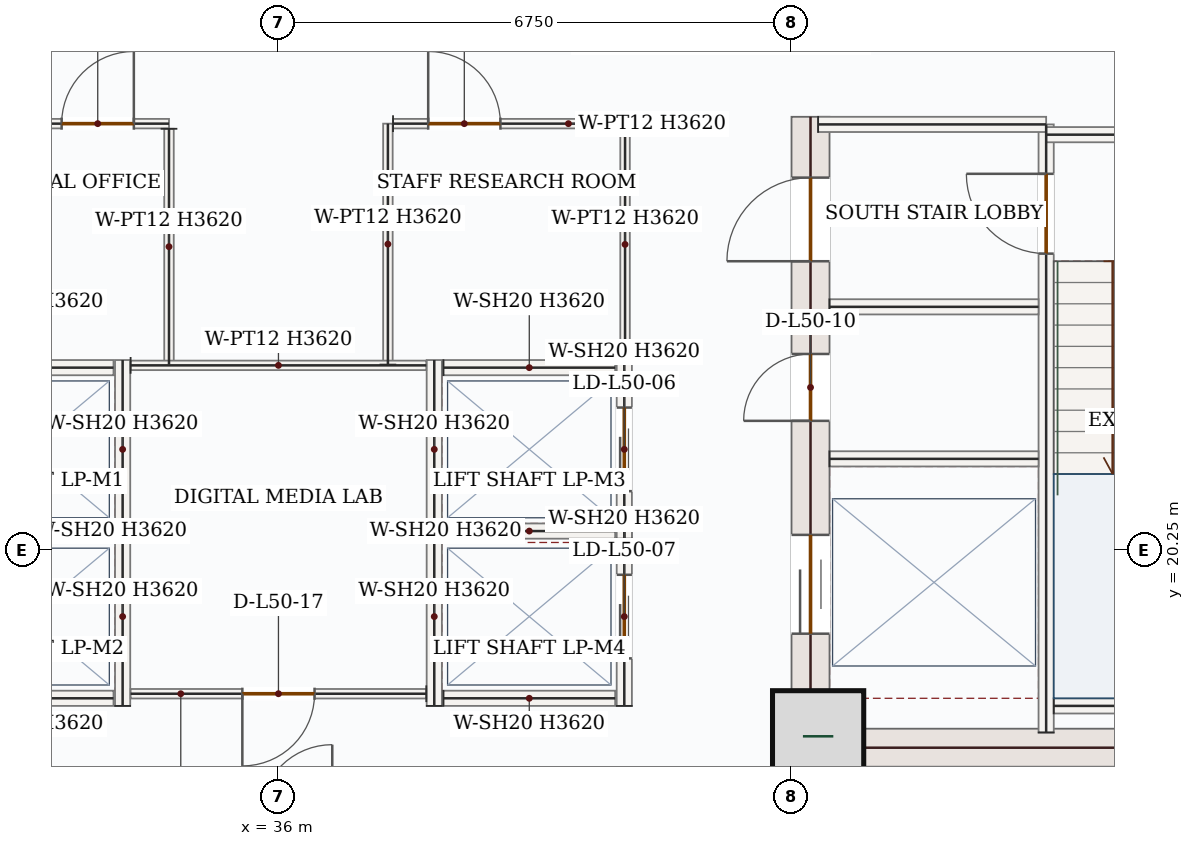
"""IFC4 building model, lengths in metres.
Left out: names, types, materials, properties, quantities, classifications, styles, units other than length and angle.
Written with IfcOpenShell. Run it as: python <this file> out.ifc"""

import sys

from ifc_helpers import new_model, si_unit, direction, frame, frame_2d, origin, origin_2d, place, context, subcontext, project, spatial, rectangle, extrude, source, transform, mapped, element, fill, save


model = new_model("IFC4")
c1 = context("Model", 3, precision=1e-05, world=origin(), true_north=direction((0.0, 1.0)))
c2 = subcontext(c1, "Body", "Model", "MODEL_VIEW")
j1 = project(units=[si_unit("LENGTHUNIT", "METRE"), si_unit("PLANEANGLEUNIT", "RADIAN")], contexts=[c1])
p1 = place(None, origin())
s1 = spatial("IfcSite", under=j1, at=p1, CompositionType="ELEMENT")
p2 = place(p1, origin())
s2 = spatial("IfcBuilding", under=s1, at=p2, CompositionType="ELEMENT")
p3 = place(p2, frame((0.0, 0.0, 213.6)))
s3 = spatial("IfcBuildingStorey", under=s2, at=p3, CompositionType="ELEMENT", Elevation=213.6)
p4 = place(p3, frame((43.0, 17.4, 0.0), z_axis=(0.0, 0.0, 1.0), x_axis=(0.0, 1.0, 0.0)))
e1 = element("IfcWall", 1, at=p4, inside=s3, PredefinedType="SHEAR", context=c2, shape_type="SweptSolid", body=[
    extrude(rectangle(XDim=8.55, YDim=0.5, at=frame_2d((4.275, 0.0))), origin(), (0.0, 0.0, 1.0), 3.62),
])
p5 = place(p4, frame((6.65, 0.0, 0.0)))
e2 = element("IfcOpeningElement", 2, at=p5, cuts=e1, PredefinedType="OPENING", context=c2, shape_type="SweptSolid", body=[
    extrude(rectangle(XDim=1.1, YDim=2.2, at=frame_2d((0.55, 1.1))), frame((0.0, 0.26, 0.0), z_axis=(0.0, -1.0, 0.0), x_axis=(1.0, 0.0, 0.0)), (0.0, 0.0, 1.0), 0.52),
])
p6 = place(p4, frame((1.75, 0.0, 0.0)))
e3 = element("IfcOpeningElement", 3, at=p6, cuts=e1, PredefinedType="OPENING", context=c2, shape_type="SweptSolid", body=[
    extrude(rectangle(XDim=1.3, YDim=2.2, at=frame_2d((0.65, 1.1))), frame((0.0, 0.26, 0.0), z_axis=(0.0, -1.0, 0.0), x_axis=(1.0, 0.0, 0.0)), (0.0, 0.0, 1.0), 0.52),
])
p7 = place(p4, frame((4.55, 0.0, 0.0)))
e4 = element("IfcOpeningElement", 4, at=p7, cuts=e1, PredefinedType="OPENING", context=c2, shape_type="SweptSolid", body=[
    extrude(rectangle(XDim=0.88, YDim=2.1, at=frame_2d((0.44, 1.05))), frame((0.0, 0.26, 0.0), z_axis=(0.0, -1.0, 0.0), x_axis=(1.0, 0.0, 0.0)), (0.0, 0.0, 1.0), 0.52),
])
m1 = source(origin(), c2, "Body", "SweptSolid", [
    extrude(rectangle(XDim=7.0, YDim=0.5, at=frame_2d((3.5, 0.0))), origin(), (0.0, 0.0, 1.0), 3.62),
])
p8 = place(p3, frame((43.25, 17.65, 0.0), z_axis=(0.0, 0.0, 1.0), x_axis=(1.0, 0.0, 0.0)))
e5 = element("IfcWall", 5, at=p8, inside=s3, PredefinedType="SHEAR", context=c2, shape_type="MappedRepresentation", body=[
    mapped(m1, transform((0.0, 0.0, 0.0), x_axis=(1.0, 0.0, 0.0), y_axis=(0.0, 1.0, 0.0), z_axis=(0.0, 0.0, 1.0), scale=1.0)),
])
m2 = source(origin(), c2, "Body", "SweptSolid", [
    extrude(rectangle(XDim=1.2, YDim=1.2, at=origin_2d()), origin(), (0.0, 0.0, 1.0), 3.9),
])
p9 = place(p3, frame((43.1, 17.8, 0.0), z_axis=(0.0, 0.0, 1.0), x_axis=(1.0, 0.0, 0.0)))
e6 = element("IfcColumn", 6, at=p9, inside=s3, PredefinedType="COLUMN", context=c2, shape_type="MappedRepresentation", body=[
    mapped(m2, transform((0.0, 0.0, 0.0), x_axis=(1.0, 0.0, 0.0), y_axis=(0.0, 1.0, 0.0), z_axis=(0.0, 0.0, 1.0), scale=1.0)),
])
p10 = place(p3, frame((46.1, 17.85, 0.0), z_axis=(0.0, 0.0, 1.0), x_axis=(0.0, 1.0, 0.0)))
e7 = element("IfcWall", 7, at=p10, inside=s3, PredefinedType="SOLIDWALL", context=c2, shape_type="SweptSolid", body=[
    extrude(rectangle(XDim=8.0, YDim=0.2, at=frame_2d((4.0, 0.0))), origin(), (0.0, 0.0, 1.0), 3.62),
])
p11 = place(p10, frame((6.3, 0.0, 0.0)))
e8 = element("IfcOpeningElement", 8, at=p11, cuts=e7, PredefinedType="OPENING", context=c2, shape_type="SweptSolid", body=[
    extrude(rectangle(XDim=1.05, YDim=2.15, at=frame_2d((0.525, 1.075))), frame((0.0, 0.11, 0.0), z_axis=(0.0, -1.0, 0.0), x_axis=(1.0, 0.0, 0.0)), (0.0, 0.0, 1.0), 0.22),
])
m3 = source(origin(), c2, "Body", "SweptSolid", [
    extrude(rectangle(XDim=3.0, YDim=0.2, at=frame_2d((1.5, 0.0))), origin(), (0.0, 0.0, 1.0), 3.62),
])
p12 = place(p3, frame((43.1, 25.85, 0.0), z_axis=(0.0, 0.0, 1.0), x_axis=(1.0, 0.0, 0.0)))
e9 = element("IfcWall", 9, at=p12, inside=s3, PredefinedType="SOLIDWALL", context=c2, shape_type="MappedRepresentation", body=[
    mapped(m3, transform((0.0, 0.0, 0.0), x_axis=(1.0, 0.0, 0.0), y_axis=(0.0, 1.0, 0.0), z_axis=(0.0, 0.0, 1.0), scale=1.0)),
])
m4 = source(origin(), c2, "Body", "SweptSolid", [
    extrude(rectangle(XDim=4.25, YDim=0.2, at=frame_2d((2.125, 0.0))), origin(), (0.0, 0.0, 1.0), 3.62),
])
p13 = place(p3, frame((46.1, 25.715, 0.0), z_axis=(0.0, 0.0, 1.0), x_axis=(1.0, 0.0, 0.0)))
e10 = element("IfcWall", 10, at=p13, inside=s3, PredefinedType="SOLIDWALL", context=c2, shape_type="MappedRepresentation", body=[
    mapped(m4, transform((0.0, 0.0, 0.0), x_axis=(1.0, 0.0, 0.0), y_axis=(0.0, 1.0, 0.0), z_axis=(0.0, 0.0, 1.0), scale=1.0)),
])
m5 = source(origin(), c2, "Body", "SweptSolid", [
    extrude(rectangle(XDim=3.25, YDim=0.2, at=frame_2d((1.625, 0.0))), origin(), (0.0, 0.0, 1.0), 3.62),
])
p14 = place(p3, frame((46.2, 18.2, 0.0), z_axis=(0.0, 0.0, 1.0), x_axis=(1.0, 0.0, 0.0)))
e11 = element("IfcWall", 11, at=p14, inside=s3, PredefinedType="SOLIDWALL", context=c2, shape_type="MappedRepresentation", body=[
    mapped(m5, transform((0.0, 0.0, 0.0), x_axis=(1.0, 0.0, 0.0), y_axis=(0.0, 1.0, 0.0), z_axis=(0.0, 0.0, 1.0), scale=1.0)),
])
m6 = source(origin(), c2, "Body", "SweptSolid", [
    extrude(rectangle(XDim=2.75, YDim=0.2, at=frame_2d((1.375, 0.0))), origin(), (0.0, 0.0, 1.0), 3.62),
])
for number, where, z_axis, x_axis in (
    (12, (43.25, 23.45, 0.0), (0.0, 0.0, 1.0), (1.0, 0.0, 0.0)),
    (13, (43.25, 21.45, 0.0), (0.0, 0.0, 1.0), (1.0, 0.0, 0.0)),
):
    element("IfcWall", number, at=place(p3, frame(where, z_axis=z_axis, x_axis=x_axis)), inside=s3, PredefinedType="SOLIDWALL", context=c2, shape_type="MappedRepresentation", body=[
        mapped(m6, transform((0.0, 0.0, 0.0), x_axis=(1.0, 0.0, 0.0), y_axis=(0.0, 1.0, 0.0), z_axis=(0.0, 0.0, 1.0), scale=1.0)),
    ])
m7 = source(origin(), c2, "Body", "SweptSolid", [
    extrude(rectangle(XDim=2.35, YDim=0.2, at=frame_2d((1.175, 0.0))), origin(), (0.0, 0.0, 1.0), 3.62),
])
p15 = place(p3, frame((33.95, 20.4, 0.0), z_axis=(0.0, 0.0, 1.0), x_axis=(0.0, 1.0, 0.0)))
e14 = element("IfcWall", 14, at=p15, inside=s3, PredefinedType="SOLIDWALL", context=c2, shape_type="MappedRepresentation", body=[
    mapped(m7, transform((0.0, 0.0, 0.0), x_axis=(1.0, 0.0, 0.0), y_axis=(0.0, 1.0, 0.0), z_axis=(0.0, 0.0, 1.0), scale=1.0)),
])
m8 = source(origin(), c2, "Body", "SweptSolid", [
    extrude(rectangle(XDim=2.26, YDim=0.2, at=frame_2d((1.13, 0.0))), origin(), (0.0, 0.0, 1.0), 3.62),
])
for number, where, z_axis, x_axis in (
    (15, (31.57, 20.5, 0.0), (0.0, 0.0, 1.0), (1.0, 0.0, 0.0)),
    (16, (31.57, 22.65, 0.0), (0.0, 0.0, 1.0), (1.0, 0.0, 0.0)),
):
    element("IfcWall", number, at=place(p3, frame(where, z_axis=z_axis, x_axis=x_axis)), inside=s3, PredefinedType="SOLIDWALL", context=c2, shape_type="MappedRepresentation", body=[
        mapped(m8, transform((0.0, 0.0, 0.0), x_axis=(1.0, 0.0, 0.0), y_axis=(0.0, 1.0, 0.0), z_axis=(0.0, 0.0, 1.0), scale=1.0)),
    ])
p16 = place(p3, frame((33.95, 18.2, 0.0), z_axis=(0.0, 0.0, 1.0), x_axis=(0.0, 1.0, 0.0)))
e17 = element("IfcWall", 17, at=p16, inside=s3, PredefinedType="SOLIDWALL", context=c2, shape_type="MappedRepresentation", body=[
    mapped(m7, transform((0.0, 0.0, 0.0), x_axis=(1.0, 0.0, 0.0), y_axis=(0.0, 1.0, 0.0), z_axis=(0.0, 0.0, 1.0), scale=1.0)),
])
p17 = place(p3, frame((31.57, 18.3, 0.0), z_axis=(0.0, 0.0, 1.0), x_axis=(1.0, 0.0, 0.0)))
e18 = element("IfcWall", 18, at=p17, inside=s3, PredefinedType="SOLIDWALL", context=c2, shape_type="MappedRepresentation", body=[
    mapped(m8, transform((0.0, 0.0, 0.0), x_axis=(1.0, 0.0, 0.0), y_axis=(0.0, 1.0, 0.0), z_axis=(0.0, 0.0, 1.0), scale=1.0)),
])
p18 = place(p3, frame((38.05, 20.4, 0.0), z_axis=(0.0, 0.0, 1.0), x_axis=(0.0, 1.0, 0.0)))
e19 = element("IfcWall", 19, at=p18, inside=s3, PredefinedType="SOLIDWALL", context=c2, shape_type="MappedRepresentation", body=[
    mapped(m7, transform((0.0, 0.0, 0.0), x_axis=(1.0, 0.0, 0.0), y_axis=(0.0, 1.0, 0.0), z_axis=(0.0, 0.0, 1.0), scale=1.0)),
])
p19 = place(p3, frame((40.55, 20.4, 0.0), z_axis=(0.0, 0.0, 1.0), x_axis=(0.0, 1.0, 0.0)))
e20 = element("IfcWall", 20, at=p19, inside=s3, PredefinedType="SOLIDWALL", context=c2, shape_type="SweptSolid", body=[
    extrude(rectangle(XDim=2.35, YDim=0.2, at=frame_2d((1.175, 0.0))), origin(), (0.0, 0.0, 1.0), 3.62),
])
p20 = place(p19, frame((0.625, 0.0, 0.0)))
e21 = element("IfcOpeningElement", 21, at=p20, cuts=e20, PredefinedType="OPENING", context=c2, shape_type="SweptSolid", body=[
    extrude(rectangle(XDim=1.1, YDim=2.15, at=frame_2d((0.55, 1.075))), frame((0.0, 0.11, 0.0), z_axis=(0.0, -1.0, 0.0), x_axis=(1.0, 0.0, 0.0)), (0.0, 0.0, 1.0), 0.22),
])
for number, where, z_axis, x_axis in (
    (22, (38.17, 20.5, 0.0), (0.0, 0.0, 1.0), (1.0, 0.0, 0.0)),
    (23, (38.17, 22.65, 0.0), (0.0, 0.0, 1.0), (1.0, 0.0, 0.0)),
):
    element("IfcWall", number, at=place(p3, frame(where, z_axis=z_axis, x_axis=x_axis)), inside=s3, PredefinedType="SOLIDWALL", context=c2, shape_type="MappedRepresentation", body=[
        mapped(m8, transform((0.0, 0.0, 0.0), x_axis=(1.0, 0.0, 0.0), y_axis=(0.0, 1.0, 0.0), z_axis=(0.0, 0.0, 1.0), scale=1.0)),
    ])
p21 = place(p3, frame((38.05, 18.2, 0.0), z_axis=(0.0, 0.0, 1.0), x_axis=(0.0, 1.0, 0.0)))
e24 = element("IfcWall", 24, at=p21, inside=s3, PredefinedType="SOLIDWALL", context=c2, shape_type="MappedRepresentation", body=[
    mapped(m7, transform((0.0, 0.0, 0.0), x_axis=(1.0, 0.0, 0.0), y_axis=(0.0, 1.0, 0.0), z_axis=(0.0, 0.0, 1.0), scale=1.0)),
])
p22 = place(p3, frame((40.55, 18.2, 0.0), z_axis=(0.0, 0.0, 1.0), x_axis=(0.0, 1.0, 0.0)))
e25 = element("IfcWall", 25, at=p22, inside=s3, PredefinedType="SOLIDWALL", context=c2, shape_type="SweptSolid", body=[
    extrude(rectangle(XDim=2.35, YDim=0.2, at=frame_2d((1.175, 0.0))), origin(), (0.0, 0.0, 1.0), 3.62),
])
p23 = place(p22, frame((0.625, 0.0, 0.0)))
e26 = element("IfcOpeningElement", 26, at=p23, cuts=e25, PredefinedType="OPENING", context=c2, shape_type="SweptSolid", body=[
    extrude(rectangle(XDim=1.1, YDim=2.15, at=frame_2d((0.55, 1.075))), frame((0.0, 0.11, 0.0), z_axis=(0.0, -1.0, 0.0), x_axis=(1.0, 0.0, 0.0)), (0.0, 0.0, 1.0), 0.22),
])
p24 = place(p3, frame((38.17, 18.3, 0.0), z_axis=(0.0, 0.0, 1.0), x_axis=(1.0, 0.0, 0.0)))
e27 = element("IfcWall", 27, at=p24, inside=s3, PredefinedType="SOLIDWALL", context=c2, shape_type="MappedRepresentation", body=[
    mapped(m8, transform((0.0, 0.0, 0.0), x_axis=(1.0, 0.0, 0.0), y_axis=(0.0, 1.0, 0.0), z_axis=(0.0, 0.0, 1.0), scale=1.0)),
])
p25 = place(p3, frame((31.508, 25.86, 0.0), z_axis=(0.0, 0.0, 1.0), x_axis=(1.0, 0.0, 0.0)))
e28 = element("IfcWall", 28, at=p25, inside=s3, PredefinedType="PARTITIONING", context=c2, shape_type="SweptSolid", body=[
    extrude(rectangle(XDim=3.052, YDim=0.125, at=frame_2d((1.526, 0.0))), origin(), (0.0, 0.0, 1.0), 3.62),
])
p26 = place(p25, frame((1.64, 0.0, 0.0)))
e29 = element("IfcOpeningElement", 29, at=p26, cuts=e28, PredefinedType="OPENING", context=c2, shape_type="SweptSolid", body=[
    extrude(rectangle(XDim=0.95, YDim=2.15, at=frame_2d((0.475, 1.075))), frame((0.0, 0.073, 0.0), z_axis=(0.0, -1.0, 0.0), x_axis=(1.0, 0.0, 0.0)), (0.0, 0.0, 1.0), 0.145),
])
m9 = source(origin(), c2, "Body", "SweptSolid", [
    extrude(rectangle(XDim=3.103, YDim=0.125, at=frame_2d((1.551, 0.0))), origin(), (0.0, 0.0, 1.0), 3.62),
])
p27 = place(p3, frame((34.56, 25.792, 0.0), z_axis=(0.0, 0.0, 1.0), x_axis=(0.0, -1.0, 0.0)))
e30 = element("IfcWall", 30, at=p27, inside=s3, PredefinedType="PARTITIONING", context=c2, shape_type="MappedRepresentation", body=[
    mapped(m9, transform((0.0, 0.0, 0.0), x_axis=(1.0, 0.0, 0.0), y_axis=(0.0, 1.0, 0.0), z_axis=(0.0, 0.0, 1.0), scale=1.0)),
])
m10 = source(origin(), c2, "Body", "SweptSolid", [
    extrude(rectangle(XDim=3.17, YDim=0.125, at=frame_2d((1.585, 0.0))), origin(), (0.0, 0.0, 1.0), 3.62),
])
p28 = place(p3, frame((37.44, 22.69, 0.0), z_axis=(0.0, 0.0, 1.0), x_axis=(0.0, 1.0, 0.0)))
e31 = element("IfcWall", 31, at=p28, inside=s3, PredefinedType="PARTITIONING", context=c2, shape_type="MappedRepresentation", body=[
    mapped(m10, transform((0.0, 0.0, 0.0), x_axis=(1.0, 0.0, 0.0), y_axis=(0.0, 1.0, 0.0), z_axis=(0.0, 0.0, 1.0), scale=1.0)),
])
p29 = place(p3, frame((37.508, 25.86, 0.0), z_axis=(0.0, 0.0, 1.0), x_axis=(1.0, 0.0, 0.0)))
e32 = element("IfcWall", 32, at=p29, inside=s3, PredefinedType="PARTITIONING", context=c2, shape_type="SweptSolid", body=[
    extrude(rectangle(XDim=3.052, YDim=0.125, at=frame_2d((1.526, 0.0))), origin(), (0.0, 0.0, 1.0), 3.62),
])
p30 = place(p29, frame((0.463, 0.0, 0.0)))
e33 = element("IfcOpeningElement", 33, at=p30, cuts=e32, PredefinedType="OPENING", context=c2, shape_type="SweptSolid", body=[
    extrude(rectangle(XDim=0.95, YDim=2.15, at=frame_2d((0.475, 1.075))), frame((0.0, 0.073, 0.0), z_axis=(0.0, -1.0, 0.0), x_axis=(1.0, 0.0, 0.0)), (0.0, 0.0, 1.0), 0.145),
])
m11 = source(origin(), c2, "Body", "SweptSolid", [
    extrude(rectangle(XDim=3.042, YDim=0.125, at=frame_2d((1.521, 0.0))), origin(), (0.0, 0.0, 1.0), 3.62),
])
p31 = place(p3, frame((40.56, 25.792, 0.0), z_axis=(0.0, 0.0, 1.0), x_axis=(0.0, -1.0, 0.0)))
e34 = element("IfcWall", 34, at=p31, inside=s3, PredefinedType="PARTITIONING", context=c2, shape_type="MappedRepresentation", body=[
    mapped(m11, transform((0.0, 0.0, 0.0), x_axis=(1.0, 0.0, 0.0), y_axis=(0.0, 1.0, 0.0), z_axis=(0.0, 0.0, 1.0), scale=1.0)),
])
m12 = source(origin(), c2, "Body", "SweptSolid", [
    extrude(rectangle(XDim=3.89, YDim=0.125, at=frame_2d((1.945, 0.0))), origin(), (0.0, 0.0, 1.0), 3.62),
])
p32 = place(p3, frame((34.055, 22.68, 0.0), z_axis=(0.0, 0.0, 1.0), x_axis=(1.0, 0.0, 0.0)))
e35 = element("IfcWall", 35, at=p32, inside=s3, PredefinedType="PARTITIONING", context=c2, shape_type="MappedRepresentation", body=[
    mapped(m12, transform((0.0, 0.0, 0.0), x_axis=(1.0, 0.0, 0.0), y_axis=(0.0, 1.0, 0.0), z_axis=(0.0, 0.0, 1.0), scale=1.0)),
])
p33 = place(p3, frame((37.945, 18.36, 0.0), z_axis=(0.0, 0.0, 1.0), x_axis=(-1.0, 0.0, 0.0)))
e36 = element("IfcWall", 36, at=p33, inside=s3, PredefinedType="PARTITIONING", context=c2, shape_type="SweptSolid", body=[
    extrude(rectangle(XDim=3.89, YDim=0.125, at=frame_2d((1.945, 0.0))), origin(), (0.0, 0.0, 1.0), 3.62),
])
p34 = place(p33, frame((1.47, 0.0, 0.0)))
e37 = element("IfcOpeningElement", 37, at=p34, cuts=e36, PredefinedType="OPENING", context=c2, shape_type="SweptSolid", body=[
    extrude(rectangle(XDim=0.95, YDim=2.15, at=frame_2d((0.475, 1.075))), frame((0.0, 0.073, 0.0), z_axis=(0.0, -1.0, 0.0), x_axis=(1.0, 0.0, 0.0)), (0.0, 0.0, 1.0), 0.145),
])
m13 = source(origin(), c2, "Body", "SweptSolid", [
    extrude(rectangle(XDim=1.05, YDim=2.15, at=frame_2d((0.525, 1.075))), frame((0.0, 0.025, 0.0), z_axis=(0.0, -1.0, 0.0), x_axis=(1.0, 0.0, 0.0)), (0.0, 0.0, 1.0), 0.05),
])
p35 = place(p11, origin())
e38 = element("IfcDoor", 38, at=p35, inside=s3, OperationType="SINGLE_SWING_RIGHT", PredefinedType="DOOR", context=c2, shape_type="MappedRepresentation", body=[
    mapped(m13, transform((0.0, 0.0, 0.0), x_axis=(1.0, 0.0, 0.0), y_axis=(0.0, 1.0, 0.0), z_axis=(0.0, 0.0, 1.0), scale=1.0)),
])
fill(e8, e38)
m14 = source(origin(), c2, "Body", "SweptSolid", [
    extrude(rectangle(XDim=1.1, YDim=2.2, at=frame_2d((0.55, 1.1))), frame((0.0, 0.025, 0.0), z_axis=(0.0, -1.0, 0.0), x_axis=(1.0, 0.0, 0.0)), (0.0, 0.0, 1.0), 0.05),
])
p36 = place(p5, origin())
e39 = element("IfcDoor", 39, at=p36, inside=s3, OperationType="SINGLE_SWING_LEFT", PredefinedType="DOOR", context=c2, shape_type="MappedRepresentation", body=[
    mapped(m14, transform((0.0, 0.0, 0.0), x_axis=(1.0, 0.0, 0.0), y_axis=(0.0, 1.0, 0.0), z_axis=(0.0, 0.0, 1.0), scale=1.0)),
])
fill(e2, e39)
m15 = source(origin(), c2, "Body", "SweptSolid", [
    extrude(rectangle(XDim=1.3, YDim=2.2, at=frame_2d((0.65, 1.1))), frame((0.0, 0.025, 0.0), z_axis=(0.0, -1.0, 0.0), x_axis=(1.0, 0.0, 0.0)), (0.0, 0.0, 1.0), 0.05),
])
p37 = place(p6, origin())
e40 = element("IfcDoor", 40, at=p37, inside=s3, OperationType="DOUBLE_DOOR_SLIDING", PredefinedType="DOOR", context=c2, shape_type="MappedRepresentation", body=[
    mapped(m15, transform((0.0, 0.0, 0.0), x_axis=(1.0, 0.0, 0.0), y_axis=(0.0, 1.0, 0.0), z_axis=(0.0, 0.0, 1.0), scale=1.0)),
])
fill(e3, e40)
m16 = source(origin(), c2, "Body", "SweptSolid", [
    extrude(rectangle(XDim=0.88, YDim=2.1, at=frame_2d((0.44, 1.05))), frame((0.0, 0.025, 0.0), z_axis=(0.0, -1.0, 0.0), x_axis=(1.0, 0.0, 0.0)), (0.0, 0.0, 1.0), 0.05),
])
p38 = place(p7, origin())
e41 = element("IfcDoor", 41, at=p38, inside=s3, OperationType="SINGLE_SWING_LEFT", PredefinedType="DOOR", context=c2, shape_type="MappedRepresentation", body=[
    mapped(m16, transform((0.0, 0.0, 0.0), x_axis=(1.0, 0.0, 0.0), y_axis=(0.0, 1.0, 0.0), z_axis=(0.0, 0.0, 1.0), scale=1.0)),
])
fill(e4, e41)
m17 = source(origin(), c2, "Body", "SweptSolid", [
    extrude(rectangle(XDim=1.1, YDim=2.15, at=frame_2d((0.55, 1.075))), frame((0.0, 0.025, 0.0), z_axis=(0.0, -1.0, 0.0), x_axis=(1.0, 0.0, 0.0)), (0.0, 0.0, 1.0), 0.05),
])
p39 = place(p20, origin())
e42 = element("IfcDoor", 42, at=p39, inside=s3, OperationType="DOUBLE_DOOR_SLIDING", PredefinedType="DOOR", context=c2, shape_type="MappedRepresentation", body=[
    mapped(m17, transform((0.0, 0.0, 0.0), x_axis=(1.0, 0.0, 0.0), y_axis=(0.0, 1.0, 0.0), z_axis=(0.0, 0.0, 1.0), scale=1.0)),
])
fill(e21, e42)
p40 = place(p23, origin())
e43 = element("IfcDoor", 43, at=p40, inside=s3, OperationType="DOUBLE_DOOR_SLIDING", PredefinedType="DOOR", context=c2, shape_type="MappedRepresentation", body=[
    mapped(m17, transform((0.0, 0.0, 0.0), x_axis=(1.0, 0.0, 0.0), y_axis=(0.0, 1.0, 0.0), z_axis=(0.0, 0.0, 1.0), scale=1.0)),
])
fill(e26, e43)
m18 = source(origin(), c2, "Body", "SweptSolid", [
    extrude(rectangle(XDim=0.95, YDim=2.15, at=frame_2d((0.475, 1.075))), frame((0.0, 0.025, 0.0), z_axis=(0.0, -1.0, 0.0), x_axis=(1.0, 0.0, 0.0)), (0.0, 0.0, 1.0), 0.05),
])
p41 = place(p26, origin())
e44 = element("IfcDoor", 44, at=p41, inside=s3, OperationType="SINGLE_SWING_RIGHT", PredefinedType="DOOR", context=c2, shape_type="MappedRepresentation", body=[
    mapped(m18, transform((0.0, 0.0, 0.0), x_axis=(1.0, 0.0, 0.0), y_axis=(0.0, 1.0, 0.0), z_axis=(0.0, 0.0, 1.0), scale=1.0)),
])
fill(e29, e44)
p42 = place(p30, origin())
e45 = element("IfcDoor", 45, at=p42, inside=s3, OperationType="SINGLE_SWING_LEFT", PredefinedType="DOOR", context=c2, shape_type="MappedRepresentation", body=[
    mapped(m18, transform((0.0, 0.0, 0.0), x_axis=(1.0, 0.0, 0.0), y_axis=(0.0, 1.0, 0.0), z_axis=(0.0, 0.0, 1.0), scale=1.0)),
])
fill(e33, e45)
p43 = place(p34, origin())
e46 = element("IfcDoor", 46, at=p43, inside=s3, OperationType="SINGLE_SWING_RIGHT", PredefinedType="DOOR", context=c2, shape_type="MappedRepresentation", body=[
    mapped(m18, transform((0.0, 0.0, 0.0), x_axis=(1.0, 0.0, 0.0), y_axis=(0.0, 1.0, 0.0), z_axis=(0.0, 0.0, 1.0), scale=1.0)),
])
fill(e37, e46)
save(model, sys.argv[1])
